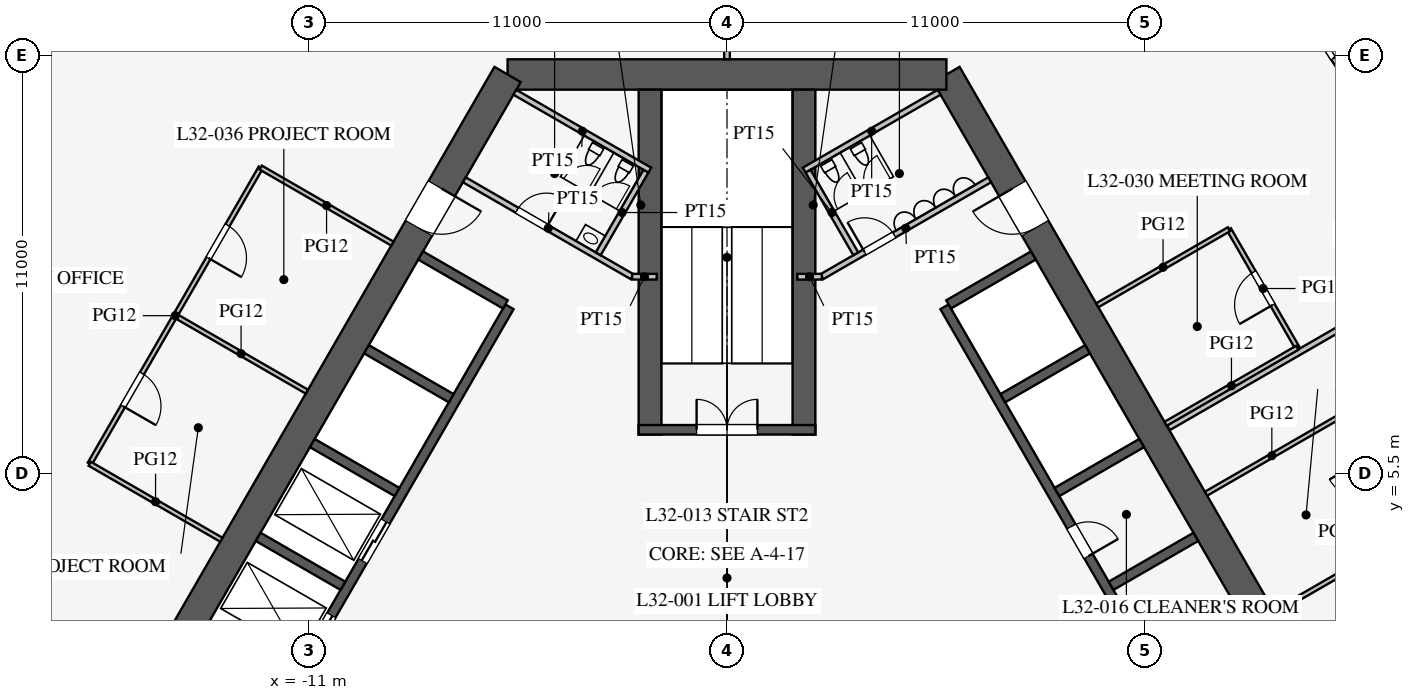
"""IFC4 building model, lengths in metres.
Left out: names, types, materials, properties, quantities, classifications, styles, units other than length and angle.
Written with IfcOpenShell. Run it as: python <this file> out.ifc"""

import sys

from ifc_helpers import new_model, si_unit, direction, frame, frame_2d, origin, place, context, subcontext, project, spatial, rectangle, extrude, element, fill, save


model = new_model("IFC4")
c1 = context("Model", 3, precision=1e-05, world=origin(), true_north=direction((0.0, 1.0)))
c2 = subcontext(c1, "Body", "Model", "MODEL_VIEW")
j1 = project(units=[si_unit("LENGTHUNIT", "METRE"), si_unit("PLANEANGLEUNIT", "RADIAN")], contexts=[c1])
p1 = place(None, origin())
s1 = spatial("IfcSite", under=j1, at=p1, CompositionType="ELEMENT")
p2 = place(p1, origin())
s2 = spatial("IfcBuilding", under=s1, at=p2, CompositionType="ELEMENT")
p3 = place(p2, frame((0.0, 0.0, 140.9)))
s3 = spatial("IfcBuildingStorey", under=s2, at=p3, CompositionType="ELEMENT", Elevation=140.9)
p4 = place(p3, frame((16.743, -3.0, 0.0), z_axis=(0.0, 0.0, 1.0), x_axis=(-0.500002442456, 0.866023993627, 0.0)))
e1 = element("IfcWall", 1, at=p4, inside=s3, PredefinedType="SHEAR", context=c2, shape_type="SweptSolid", body=[
    extrude(rectangle(XDim=21.939, YDim=0.8, at=frame_2d((10.97, 0.0))), origin(), (0.0, 0.0, 1.0), 4.2),
])
p5 = place(p4, frame((17.27, 0.0, 0.0)))
e2 = element("IfcOpeningElement", 2, at=p5, cuts=e1, PredefinedType="OPENING", context=c2, shape_type="SweptSolid", body=[
    extrude(rectangle(XDim=1.2, YDim=2.1, at=frame_2d((0.6, 1.05))), frame((0.0, 0.41, 0.0), z_axis=(0.0, -1.0, 0.0), x_axis=(1.0, 0.0, 0.0)), (0.0, 0.0, 1.0), 0.82),
])
p6 = place(p4, frame((3.47, 0.0, 0.0)))
e3 = element("IfcOpeningElement", 3, at=p6, cuts=e1, PredefinedType="OPENING", context=c2, shape_type="SweptSolid", body=[
    extrude(rectangle(XDim=1.2, YDim=2.1, at=frame_2d((0.6, 1.05))), frame((0.0, 0.41, 0.0), z_axis=(0.0, -1.0, 0.0), x_axis=(1.0, 0.0, 0.0)), (0.0, 0.0, 1.0), 0.82),
])
p7 = place(p3, frame((5.773, 16.0, 0.0), z_axis=(0.0, 0.0, 1.0), x_axis=(-1.0, 0.0, 0.0)))
e4 = element("IfcWall", 4, at=p7, inside=s3, PredefinedType="SHEAR", context=c2, shape_type="SweptSolid", body=[
    extrude(rectangle(XDim=11.547, YDim=0.8, at=frame_2d((5.773, 0.0))), origin(), (0.0, 0.0, 1.0), 4.2),
])
p8 = place(p3, frame((-5.773, 16.0, 0.0), z_axis=(0.0, 0.0, 1.0), x_axis=(-0.500002442456, -0.866023993627, 0.0)))
e5 = element("IfcWall", 5, at=p8, inside=s3, PredefinedType="SHEAR", context=c2, shape_type="SweptSolid", body=[
    extrude(rectangle(XDim=21.939, YDim=0.8, at=frame_2d((10.97, 0.0))), origin(), (0.0, 0.0, 1.0), 4.2),
])
p9 = place(p8, frame((17.27, 0.0, 0.0)))
e6 = element("IfcOpeningElement", 6, at=p9, cuts=e5, PredefinedType="OPENING", context=c2, shape_type="SweptSolid", body=[
    extrude(rectangle(XDim=1.2, YDim=2.1, at=frame_2d((0.6, 1.05))), frame((0.0, 0.41, 0.0), z_axis=(0.0, -1.0, 0.0), x_axis=(1.0, 0.0, 0.0)), (0.0, 0.0, 1.0), 0.82),
])
p10 = place(p8, frame((3.47, 0.0, 0.0)))
e7 = element("IfcOpeningElement", 7, at=p10, cuts=e5, PredefinedType="OPENING", context=c2, shape_type="SweptSolid", body=[
    extrude(rectangle(XDim=1.2, YDim=2.1, at=frame_2d((0.6, 1.05))), frame((0.0, 0.41, 0.0), z_axis=(0.0, -1.0, 0.0), x_axis=(1.0, 0.0, 0.0)), (0.0, 0.0, 1.0), 0.82),
])
p11 = place(p3, frame((11.424, 0.014, 0.0), z_axis=(0.0, 0.0, 1.0), x_axis=(-0.500001763848, 0.866024385424, 0.0)))
e8 = element("IfcWall", 8, at=p11, inside=s3, PredefinedType="SHEAR", context=c2, shape_type="SweptSolid", body=[
    extrude(rectangle(XDim=11.4, YDim=0.25, at=frame_2d((5.7, 0.0))), origin(), (0.0, 0.0, 1.0), 4.2),
])
p12 = place(p11, frame((0.975, 0.0, 0.0)))
e9 = element("IfcOpeningElement", 9, at=p12, cuts=e8, PredefinedType="OPENING", context=c2, shape_type="SweptSolid", body=[
    extrude(rectangle(XDim=0.9, YDim=2.1, at=frame_2d((0.45, 1.05))), frame((0.0, 0.135, 0.0), z_axis=(0.0, -1.0, 0.0), x_axis=(1.0, 0.0, 0.0)), (0.0, 0.0, 1.0), 0.27),
])
p13 = place(p11, frame((3.825, 0.0, 0.0)))
e10 = element("IfcOpeningElement", 10, at=p13, cuts=e8, PredefinedType="OPENING", context=c2, shape_type="SweptSolid", body=[
    extrude(rectangle(XDim=0.9, YDim=2.1, at=frame_2d((0.45, 1.05))), frame((0.0, 0.135, 0.0), z_axis=(0.0, -1.0, 0.0), x_axis=(1.0, 0.0, 0.0)), (0.0, 0.0, 1.0), 0.27),
])
for number, where, z_axis, x_axis in (
    (11, (10.107, 2.544, 0.0), (0.0, 0.0, 1.0), (0.866, 0.5, 0.0)),
    (12, (8.682, 5.012, 0.0), (0.0, 0.0, 1.0), (0.866, 0.5, 0.0)),
    (13, (7.257, 7.481, 0.0), (0.0, 0.0, 1.0), (0.866, 0.5, 0.0)),
):
    element("IfcWall", number, at=place(p3, frame(where, z_axis=z_axis, x_axis=x_axis)), inside=s3, PredefinedType="SHEAR", context=c2, shape_type="SweptSolid", body=[
        extrude(rectangle(XDim=2.575, YDim=0.25, at=frame_2d((1.288, 0.0))), origin(), (0.0, 0.0, 1.0), 4.2),
    ])
p14 = place(p3, frame((5.832, 9.949, 0.0), z_axis=(0.0, 0.0, 1.0), x_axis=(0.866029291668, 0.499993265928, 0.0)))
e14 = element("IfcWall", 14, at=p14, inside=s3, PredefinedType="SHEAR", context=c2, shape_type="SweptSolid", body=[
    extrude(rectangle(XDim=2.575, YDim=0.25, at=frame_2d((1.288, 0.0))), origin(), (0.0, 0.0, 1.0), 4.2),
])
p15 = place(p3, frame((-5.724, 9.886, 0.0), z_axis=(0.0, 0.0, 1.0), x_axis=(-0.500001763848, -0.866024385424, 0.0)))
e15 = element("IfcWall", 15, at=p15, inside=s3, PredefinedType="SHEAR", context=c2, shape_type="SweptSolid", body=[
    extrude(rectangle(XDim=11.4, YDim=0.25, at=frame_2d((5.7, 0.0))), origin(), (0.0, 0.0, 1.0), 4.2),
])
p16 = place(p15, frame((6.525, 0.0, 0.0)))
e16 = element("IfcOpeningElement", 16, at=p16, cuts=e15, PredefinedType="OPENING", context=c2, shape_type="SweptSolid", body=[
    extrude(rectangle(XDim=1.2, YDim=2.2, at=frame_2d((0.6, 1.1))), frame((0.0, 0.135, 0.0), z_axis=(0.0, -1.0, 0.0), x_axis=(1.0, 0.0, 0.0)), (0.0, 0.0, 1.0), 0.27),
])
p17 = place(p15, frame((9.375, 0.0, 0.0)))
e17 = element("IfcOpeningElement", 17, at=p17, cuts=e15, PredefinedType="OPENING", context=c2, shape_type="SweptSolid", body=[
    extrude(rectangle(XDim=1.2, YDim=2.2, at=frame_2d((0.6, 1.1))), frame((0.0, 0.135, 0.0), z_axis=(0.0, -1.0, 0.0), x_axis=(1.0, 0.0, 0.0)), (0.0, 0.0, 1.0), 0.27),
])
p18 = place(p3, frame((-5.832, 9.949, 0.0), z_axis=(0.0, 0.0, 1.0), x_axis=(-0.866029291668, 0.499993265928, 0.0)))
e18 = element("IfcWall", 18, at=p18, inside=s3, PredefinedType="SHEAR", context=c2, shape_type="SweptSolid", body=[
    extrude(rectangle(XDim=2.575, YDim=0.25, at=frame_2d((1.288, 0.0))), origin(), (0.0, 0.0, 1.0), 4.2),
])
for number, where, z_axis, x_axis in (
    (19, (-7.257, 7.481, 0.0), (0.0, 0.0, 1.0), (-0.866, 0.5, 0.0)),
    (20, (-8.682, 5.012, 0.0), (0.0, 0.0, 1.0), (-0.866, 0.5, 0.0)),
    (21, (-10.107, 2.544, 0.0), (0.0, 0.0, 1.0), (-0.866, 0.5, 0.0)),
):
    element("IfcWall", number, at=place(p3, frame(where, z_axis=z_axis, x_axis=x_axis)), inside=s3, PredefinedType="SHEAR", context=c2, shape_type="SweptSolid", body=[
        extrude(rectangle(XDim=2.575, YDim=0.25, at=frame_2d((1.288, 0.0))), origin(), (0.0, 0.0, 1.0), 4.2),
    ])
for number, where, z_axis, x_axis in (
    (22, (2.025, 6.525, 0.0), (0.0, 0.0, 1.0), (0.0, 1.0, 0.0)),
    (23, (-2.025, 6.525, 0.0), (0.0, 0.0, 1.0), (0.0, 1.0, 0.0)),
):
    element("IfcWall", number, at=place(p3, frame(where, z_axis=z_axis, x_axis=x_axis)), inside=s3, PredefinedType="SHEAR", context=c2, shape_type="SweptSolid", body=[
        extrude(rectangle(XDim=9.075, YDim=0.6, at=frame_2d((4.538, 0.0))), origin(), (0.0, 0.0, 1.0), 4.2),
    ])
p19 = place(p3, frame((2.325, 6.65, 0.0), z_axis=(0.0, 0.0, 1.0), x_axis=(-1.0, 0.0, 0.0)))
e24 = element("IfcWall", 24, at=p19, inside=s3, PredefinedType="SHEAR", context=c2, shape_type="SweptSolid", body=[
    extrude(rectangle(XDim=4.65, YDim=0.25, at=frame_2d((2.325, 0.0))), origin(), (0.0, 0.0, 1.0), 4.2),
])
p20 = place(p19, frame((1.525, 0.0, 0.0)))
e25 = element("IfcOpeningElement", 25, at=p20, cuts=e24, PredefinedType="OPENING", context=c2, shape_type="SweptSolid", body=[
    extrude(rectangle(XDim=1.6, YDim=2.1, at=frame_2d((0.8, 1.05))), frame((0.0, 0.135, 0.0), z_axis=(0.0, -1.0, 0.0), x_axis=(1.0, 0.0, 0.0)), (0.0, 0.0, 1.0), 0.27),
])
p21 = place(p3, frame((2.495, 10.678, 0.0), z_axis=(0.0, 0.0, 1.0), x_axis=(0.86602216432, 0.500005610874, 0.0)))
e26 = element("IfcWall", 26, at=p21, inside=s3, PredefinedType="PARTITIONING", context=c2, shape_type="SweptSolid", body=[
    extrude(rectangle(XDim=5.1, YDim=0.15, at=frame_2d((2.55, 0.0))), origin(), (0.0, 0.0, 1.0), 4.0),
])
p22 = place(p21, frame((1.3, 0.0, 0.0)))
e27 = element("IfcOpeningElement", 27, at=p22, cuts=e26, PredefinedType="OPENING", context=c2, shape_type="SweptSolid", body=[
    extrude(rectangle(XDim=0.9, YDim=2.1, at=frame_2d((0.45, 1.05))), frame((0.0, 0.085, 0.0), z_axis=(0.0, -1.0, 0.0), x_axis=(1.0, 0.0, 0.0)), (0.0, 0.0, 1.0), 0.17),
])
p23 = place(p3, frame((-2.495, 10.678, 0.0), z_axis=(0.0, 0.0, 1.0), x_axis=(-0.86602216432, 0.500005610874, 0.0)))
e28 = element("IfcWall", 28, at=p23, inside=s3, PredefinedType="PARTITIONING", context=c2, shape_type="SweptSolid", body=[
    extrude(rectangle(XDim=5.1, YDim=0.15, at=frame_2d((2.55, 0.0))), origin(), (0.0, 0.0, 1.0), 4.0),
])
p24 = place(p23, frame((2.6, 0.0, 0.0)))
e29 = element("IfcOpeningElement", 29, at=p24, cuts=e28, PredefinedType="OPENING", context=c2, shape_type="SweptSolid", body=[
    extrude(rectangle(XDim=0.9, YDim=2.1, at=frame_2d((0.45, 1.05))), frame((0.0, 0.085, 0.0), z_axis=(0.0, -1.0, 0.0), x_axis=(1.0, 0.0, 0.0)), (0.0, 0.0, 1.0), 0.17),
])
for number, where, z_axis, x_axis in (
    (30, (2.495, 10.678, 0.0), (0.0, 0.0, 1.0), (-1.0, 0.0, 0.0)),
    (31, (-2.495, 10.678, 0.0), (0.0, 0.0, 1.0), (1.0, 0.0, 0.0)),
):
    element("IfcWall", number, at=place(p3, frame(where, z_axis=z_axis, x_axis=x_axis)), inside=s3, PredefinedType="PARTITIONING", context=c2, shape_type="SweptSolid", body=[
        extrude(rectangle(XDim=0.645, YDim=0.15, at=frame_2d((0.323, 0.0))), origin(), (0.0, 0.0, 1.0), 4.0),
    ])
p25 = place(p3, frame((2.031, 13.482, 0.0), z_axis=(0.0, 0.0, 1.0), x_axis=(0.866050731258, 0.499956128963, 0.0)))
e32 = element("IfcWall", 32, at=p25, inside=s3, PredefinedType="PARTITIONING", context=c2, shape_type="SweptSolid", body=[
    extrude(rectangle(XDim=4.1, YDim=0.15, at=frame_2d((2.05, 0.0))), origin(), (0.0, 0.0, 1.0), 4.0),
])
p26 = place(p3, frame((3.389, 11.281, 0.0), z_axis=(0.0, 0.0, 1.0), x_axis=(-0.499989096993, 0.866031698547, 0.0)))
e33 = element("IfcWall", 33, at=p26, inside=s3, PredefinedType="PARTITIONING", context=c2, shape_type="SweptSolid", body=[
    extrude(rectangle(XDim=2.51, YDim=0.15, at=frame_2d((1.255, 0.0))), origin(), (0.0, 0.0, 1.0), 4.0),
])
p27 = place(p3, frame((-2.031, 13.482, 0.0), z_axis=(0.0, 0.0, 1.0), x_axis=(-0.866050731258, 0.499956128963, 0.0)))
e34 = element("IfcWall", 34, at=p27, inside=s3, PredefinedType="PARTITIONING", context=c2, shape_type="SweptSolid", body=[
    extrude(rectangle(XDim=4.1, YDim=0.15, at=frame_2d((2.05, 0.0))), origin(), (0.0, 0.0, 1.0), 4.0),
])
p28 = place(p3, frame((-3.389, 11.281, 0.0), z_axis=(0.0, 0.0, 1.0), x_axis=(0.499989096993, 0.866031698547, 0.0)))
e35 = element("IfcWall", 35, at=p28, inside=s3, PredefinedType="PARTITIONING", context=c2, shape_type="SweptSolid", body=[
    extrude(rectangle(XDim=2.51, YDim=0.15, at=frame_2d((1.255, 0.0))), origin(), (0.0, 0.0, 1.0), 4.0),
])
p29 = place(p3, frame((0.0, 16.4, 0.0), z_axis=(0.0, 0.0, 1.0), x_axis=(0.0, 1.0, 0.0)))
e36 = element("IfcWall", 36, at=p29, inside=s3, PredefinedType="PARTITIONING", context=c2, shape_type="SweptSolid", body=[
    extrude(rectangle(XDim=16.65, YDim=0.15, at=frame_2d((8.325, 0.0))), origin(), (0.0, 0.0, 1.0), 2.3),
])
p30 = place(p3, frame((11.613, 6.705, 0.0), z_axis=(0.0, 0.0, 1.0), x_axis=(0.866031170684, 0.499990011303, 0.0)))
e37 = element("IfcWall", 37, at=p30, inside=s3, PredefinedType="PARTITIONING", context=c2, shape_type="SweptSolid", body=[
    extrude(rectangle(XDim=11.585, YDim=0.15, at=frame_2d((5.792, 0.0))), origin(), (0.0, 0.0, 1.0), 3.2),
])
p31 = place(p3, frame((15.006, 8.808, 0.0), z_axis=(0.0, 0.0, 1.0), x_axis=(-0.500012057535, 0.866018442252, 0.0)))
e38 = element("IfcWall", 38, at=p31, inside=s3, PredefinedType="PARTITIONING", context=c2, shape_type="SweptSolid", body=[
    extrude(rectangle(XDim=3.6, YDim=0.12, at=frame_2d((1.8, 0.0))), origin(), (0.0, 0.0, 1.0), 2.9),
])
p32 = place(p31, frame((1.3, 0.0, 0.15)))
e39 = element("IfcOpeningElement", 39, at=p32, cuts=e38, PredefinedType="OPENING", context=c2, shape_type="SweptSolid", body=[
    extrude(rectangle(XDim=1.0, YDim=2.1, at=frame_2d((0.5, 1.05))), frame((0.0, 0.07, 0.0), z_axis=(0.0, -1.0, 0.0), x_axis=(1.0, 0.0, 0.0)), (0.0, 0.0, 1.0), 0.14),
])
for number, where, z_axis, x_axis in (
    (40, (11.542, 6.808, 0.0), (0.0, 0.0, 1.0), (0.866, 0.5, 0.0)),
    (41, (9.742, 9.926, 0.0), (0.0, 0.0, 1.0), (0.866, 0.5, 0.0)),
    (42, (12.605, 4.968, 0.0), (0.0, 0.0, 1.0), (0.866, 0.5, 0.0)),
    (43, (14.405, 1.85, 0.0), (0.0, 0.0, 1.0), (0.866, 0.5, 0.0)),
):
    element("IfcWall", number, at=place(p3, frame(where, z_axis=z_axis, x_axis=x_axis)), inside=s3, PredefinedType="PARTITIONING", context=c2, shape_type="SweptSolid", body=[
        extrude(rectangle(XDim=4.0, YDim=0.12, at=frame_2d((2.0, 0.0))), origin(), (0.0, 0.0, 1.0), 2.9),
    ])
p33 = place(p3, frame((16.905, 14.956, 0.0), z_axis=(0.0, 0.0, 1.0), x_axis=(-0.546069464151, 0.837739900161, 0.0)))
e44 = element("IfcWall", 44, at=p33, inside=s3, PredefinedType="PARTITIONING", context=c2, shape_type="SweptSolid", body=[
    extrude(rectangle(XDim=4.507, YDim=0.12, at=frame_2d((2.253, 0.0))), origin(), (0.0, 0.0, 1.0), 2.9),
])
p34 = place(p33, frame((1.75, 0.0, 0.15)))
e45 = element("IfcOpeningElement", 45, at=p34, cuts=e44, PredefinedType="OPENING", context=c2, shape_type="SweptSolid", body=[
    extrude(rectangle(XDim=1.0, YDim=2.1, at=frame_2d((0.5, 1.05))), frame((0.0, 0.07, 0.0), z_axis=(0.0, -1.0, 0.0), x_axis=(1.0, 0.0, 0.0)), (0.0, 0.0, 1.0), 0.14),
])
p35 = place(p3, frame((-14.519, 9.653, 0.0), z_axis=(0.0, 0.0, 1.0), x_axis=(-0.500013631625, -0.866017533419, 0.0)))
e46 = element("IfcWall", 46, at=p35, inside=s3, PredefinedType="PARTITIONING", context=c2, shape_type="SweptSolid", body=[
    extrude(rectangle(XDim=4.5, YDim=0.12, at=frame_2d((2.25, 0.0))), origin(), (0.0, 0.0, 1.0), 2.9),
])
p36 = place(p35, frame((1.75, 0.0, 0.15)))
e47 = element("IfcOpeningElement", 47, at=p36, cuts=e46, PredefinedType="OPENING", context=c2, shape_type="SweptSolid", body=[
    extrude(rectangle(XDim=1.0, YDim=2.1, at=frame_2d((0.5, 1.05))), frame((0.0, 0.07, 0.0), z_axis=(0.0, -1.0, 0.0), x_axis=(1.0, 0.0, 0.0)), (0.0, 0.0, 1.0), 0.14),
])
p37 = place(p3, frame((-12.269, 13.55, 0.0), z_axis=(0.0, 0.0, 1.0), x_axis=(-0.499990139034, -0.866031096941, 0.0)))
e48 = element("IfcWall", 48, at=p37, inside=s3, PredefinedType="PARTITIONING", context=c2, shape_type="SweptSolid", body=[
    extrude(rectangle(XDim=4.5, YDim=0.12, at=frame_2d((2.25, 0.0))), origin(), (0.0, 0.0, 1.0), 2.9),
])
p38 = place(p37, frame((1.75, 0.0, 0.15)))
e49 = element("IfcOpeningElement", 49, at=p38, cuts=e48, PredefinedType="OPENING", context=c2, shape_type="SweptSolid", body=[
    extrude(rectangle(XDim=1.0, YDim=2.1, at=frame_2d((0.5, 1.05))), frame((0.0, 0.07, 0.0), z_axis=(0.0, -1.0, 0.0), x_axis=(1.0, 0.0, 0.0)), (0.0, 0.0, 1.0), 0.14),
])
for number, where, z_axis, x_axis in (
    (50, (-13.305, 3.756, 0.0), (0.0, 0.0, 1.0), (-0.866, 0.5, 0.0)),
    (51, (-11.055, 7.653, 0.0), (0.0, 0.0, 1.0), (-0.866, 0.5, 0.0)),
    (52, (-8.805, 11.55, 0.0), (0.0, 0.0, 1.0), (-0.866, 0.5, 0.0)),
):
    element("IfcWall", number, at=place(p3, frame(where, z_axis=z_axis, x_axis=x_axis)), inside=s3, PredefinedType="PARTITIONING", context=c2, shape_type="SweptSolid", body=[
        extrude(rectangle(XDim=4.0, YDim=0.12, at=frame_2d((2.0, 0.0))), origin(), (0.0, 0.0, 1.0), 2.9),
    ])
p39 = place(p22, origin())
e53 = element("IfcDoor", 53, at=p39, inside=s3, OperationType="SINGLE_SWING_LEFT", PredefinedType="DOOR", context=c2, shape_type="SweptSolid", body=[
    extrude(rectangle(XDim=0.9, YDim=2.1, at=frame_2d((0.45, 1.05))), frame((0.0, 0.025, 0.0), z_axis=(0.0, -1.0, 0.0), x_axis=(1.0, 0.0, 0.0)), (0.0, 0.0, 1.0), 0.05),
])
fill(e27, e53)
p40 = place(p24, frame((0.9, 0.0, 0.0), z_axis=(0.0, 0.0, 1.0), x_axis=(-1.0, 0.0, 0.0)))
e54 = element("IfcDoor", 54, at=p40, inside=s3, OperationType="SINGLE_SWING_RIGHT", PredefinedType="DOOR", context=c2, shape_type="SweptSolid", body=[
    extrude(rectangle(XDim=0.9, YDim=2.1, at=frame_2d((0.45, 1.05))), frame((0.0, 0.025, 0.0), z_axis=(0.0, -1.0, 0.0), x_axis=(1.0, 0.0, 0.0)), (0.0, 0.0, 1.0), 0.05),
])
fill(e29, e54)
p41 = place(p20, frame((1.6, 0.0, 0.0), z_axis=(0.0, 0.0, 1.0), x_axis=(-1.0, 0.0, 0.0)))
e55 = element("IfcDoor", 55, at=p41, inside=s3, OperationType="DOUBLE_DOOR_SINGLE_SWING", PredefinedType="DOOR", context=c2, shape_type="SweptSolid", body=[
    extrude(rectangle(XDim=1.6, YDim=2.1, at=frame_2d((0.8, 1.05))), frame((0.0, 0.025, 0.0), z_axis=(0.0, -1.0, 0.0), x_axis=(1.0, 0.0, 0.0)), (0.0, 0.0, 1.0), 0.05),
])
fill(e25, e55)
p42 = place(p5, origin())
e56 = element("IfcDoor", 56, at=p42, inside=s3, OperationType="SINGLE_SWING_RIGHT", PredefinedType="DOOR", context=c2, shape_type="SweptSolid", body=[
    extrude(rectangle(XDim=1.2, YDim=2.1, at=frame_2d((0.6, 1.05))), frame((0.0, 0.025, 0.0), z_axis=(0.0, -1.0, 0.0), x_axis=(1.0, 0.0, 0.0)), (0.0, 0.0, 1.0), 0.05),
])
fill(e2, e56)
p43 = place(p10, origin())
e57 = element("IfcDoor", 57, at=p43, inside=s3, OperationType="SINGLE_SWING_LEFT", PredefinedType="DOOR", context=c2, shape_type="SweptSolid", body=[
    extrude(rectangle(XDim=1.2, YDim=2.1, at=frame_2d((0.6, 1.05))), frame((0.0, 0.025, 0.0), z_axis=(0.0, -1.0, 0.0), x_axis=(1.0, 0.0, 0.0)), (0.0, 0.0, 1.0), 0.05),
])
fill(e7, e57)
p44 = place(p13, frame((0.9, 0.0, 0.0), z_axis=(0.0, 0.0, 1.0), x_axis=(-1.0, 0.0, 0.0)))
e58 = element("IfcDoor", 58, at=p44, inside=s3, OperationType="SINGLE_SWING_RIGHT", PredefinedType="DOOR", context=c2, shape_type="SweptSolid", body=[
    extrude(rectangle(XDim=0.9, YDim=2.1, at=frame_2d((0.45, 1.05))), frame((0.0, 0.025, 0.0), z_axis=(0.0, -1.0, 0.0), x_axis=(1.0, 0.0, 0.0)), (0.0, 0.0, 1.0), 0.05),
])
fill(e10, e58)
p45 = place(p32, origin())
e59 = element("IfcDoor", 59, at=p45, inside=s3, OperationType="SINGLE_SWING_LEFT", PredefinedType="DOOR", context=c2, shape_type="SweptSolid", body=[
    extrude(rectangle(XDim=1.0, YDim=2.1, at=frame_2d((0.5, 1.05))), frame((0.0, 0.025, 0.0), z_axis=(0.0, -1.0, 0.0), x_axis=(1.0, 0.0, 0.0)), (0.0, 0.0, 1.0), 0.05),
])
fill(e39, e59)
p46 = place(p34, frame((1.0, 0.0, 0.0), z_axis=(0.0, 0.0, 1.0), x_axis=(-1.0, 0.0, 0.0)))
e60 = element("IfcDoor", 60, at=p46, inside=s3, OperationType="SINGLE_SWING_RIGHT", PredefinedType="DOOR", context=c2, shape_type="SweptSolid", body=[
    extrude(rectangle(XDim=1.0, YDim=2.1, at=frame_2d((0.5, 1.05))), frame((0.0, 0.025, 0.0), z_axis=(0.0, -1.0, 0.0), x_axis=(1.0, 0.0, 0.0)), (0.0, 0.0, 1.0), 0.05),
])
fill(e45, e60)
p47 = place(p38, origin())
e61 = element("IfcDoor", 61, at=p47, inside=s3, OperationType="SINGLE_SWING_RIGHT", PredefinedType="DOOR", context=c2, shape_type="SweptSolid", body=[
    extrude(rectangle(XDim=1.0, YDim=2.1, at=frame_2d((0.5, 1.05))), frame((0.0, 0.025, 0.0), z_axis=(0.0, -1.0, 0.0), x_axis=(1.0, 0.0, 0.0)), (0.0, 0.0, 1.0), 0.05),
])
fill(e49, e61)
p48 = place(p36, origin())
e62 = element("IfcDoor", 62, at=p48, inside=s3, OperationType="SINGLE_SWING_RIGHT", PredefinedType="DOOR", context=c2, shape_type="SweptSolid", body=[
    extrude(rectangle(XDim=1.0, YDim=2.1, at=frame_2d((0.5, 1.05))), frame((0.0, 0.025, 0.0), z_axis=(0.0, -1.0, 0.0), x_axis=(1.0, 0.0, 0.0)), (0.0, 0.0, 1.0), 0.05),
])
fill(e47, e62)
p49 = place(p16, origin())
e63 = element("IfcDoor", 63, at=p49, inside=s3, OperationType="DOUBLE_DOOR_SLIDING", PredefinedType="DOOR", context=c2, shape_type="SweptSolid", body=[
    extrude(rectangle(XDim=1.2, YDim=2.2, at=frame_2d((0.6, 1.1))), frame((0.0, 0.025, 0.0), z_axis=(0.0, -1.0, 0.0), x_axis=(1.0, 0.0, 0.0)), (0.0, 0.0, 1.0), 0.05),
])
fill(e16, e63)
p50 = place(p17, origin())
e64 = element("IfcDoor", 64, at=p50, inside=s3, OperationType="DOUBLE_DOOR_SLIDING", PredefinedType="DOOR", context=c2, shape_type="SweptSolid", body=[
    extrude(rectangle(XDim=1.2, YDim=2.2, at=frame_2d((0.6, 1.1))), frame((0.0, 0.025, 0.0), z_axis=(0.0, -1.0, 0.0), x_axis=(1.0, 0.0, 0.0)), (0.0, 0.0, 1.0), 0.05),
])
fill(e17, e64)
save(model, sys.argv[1])
